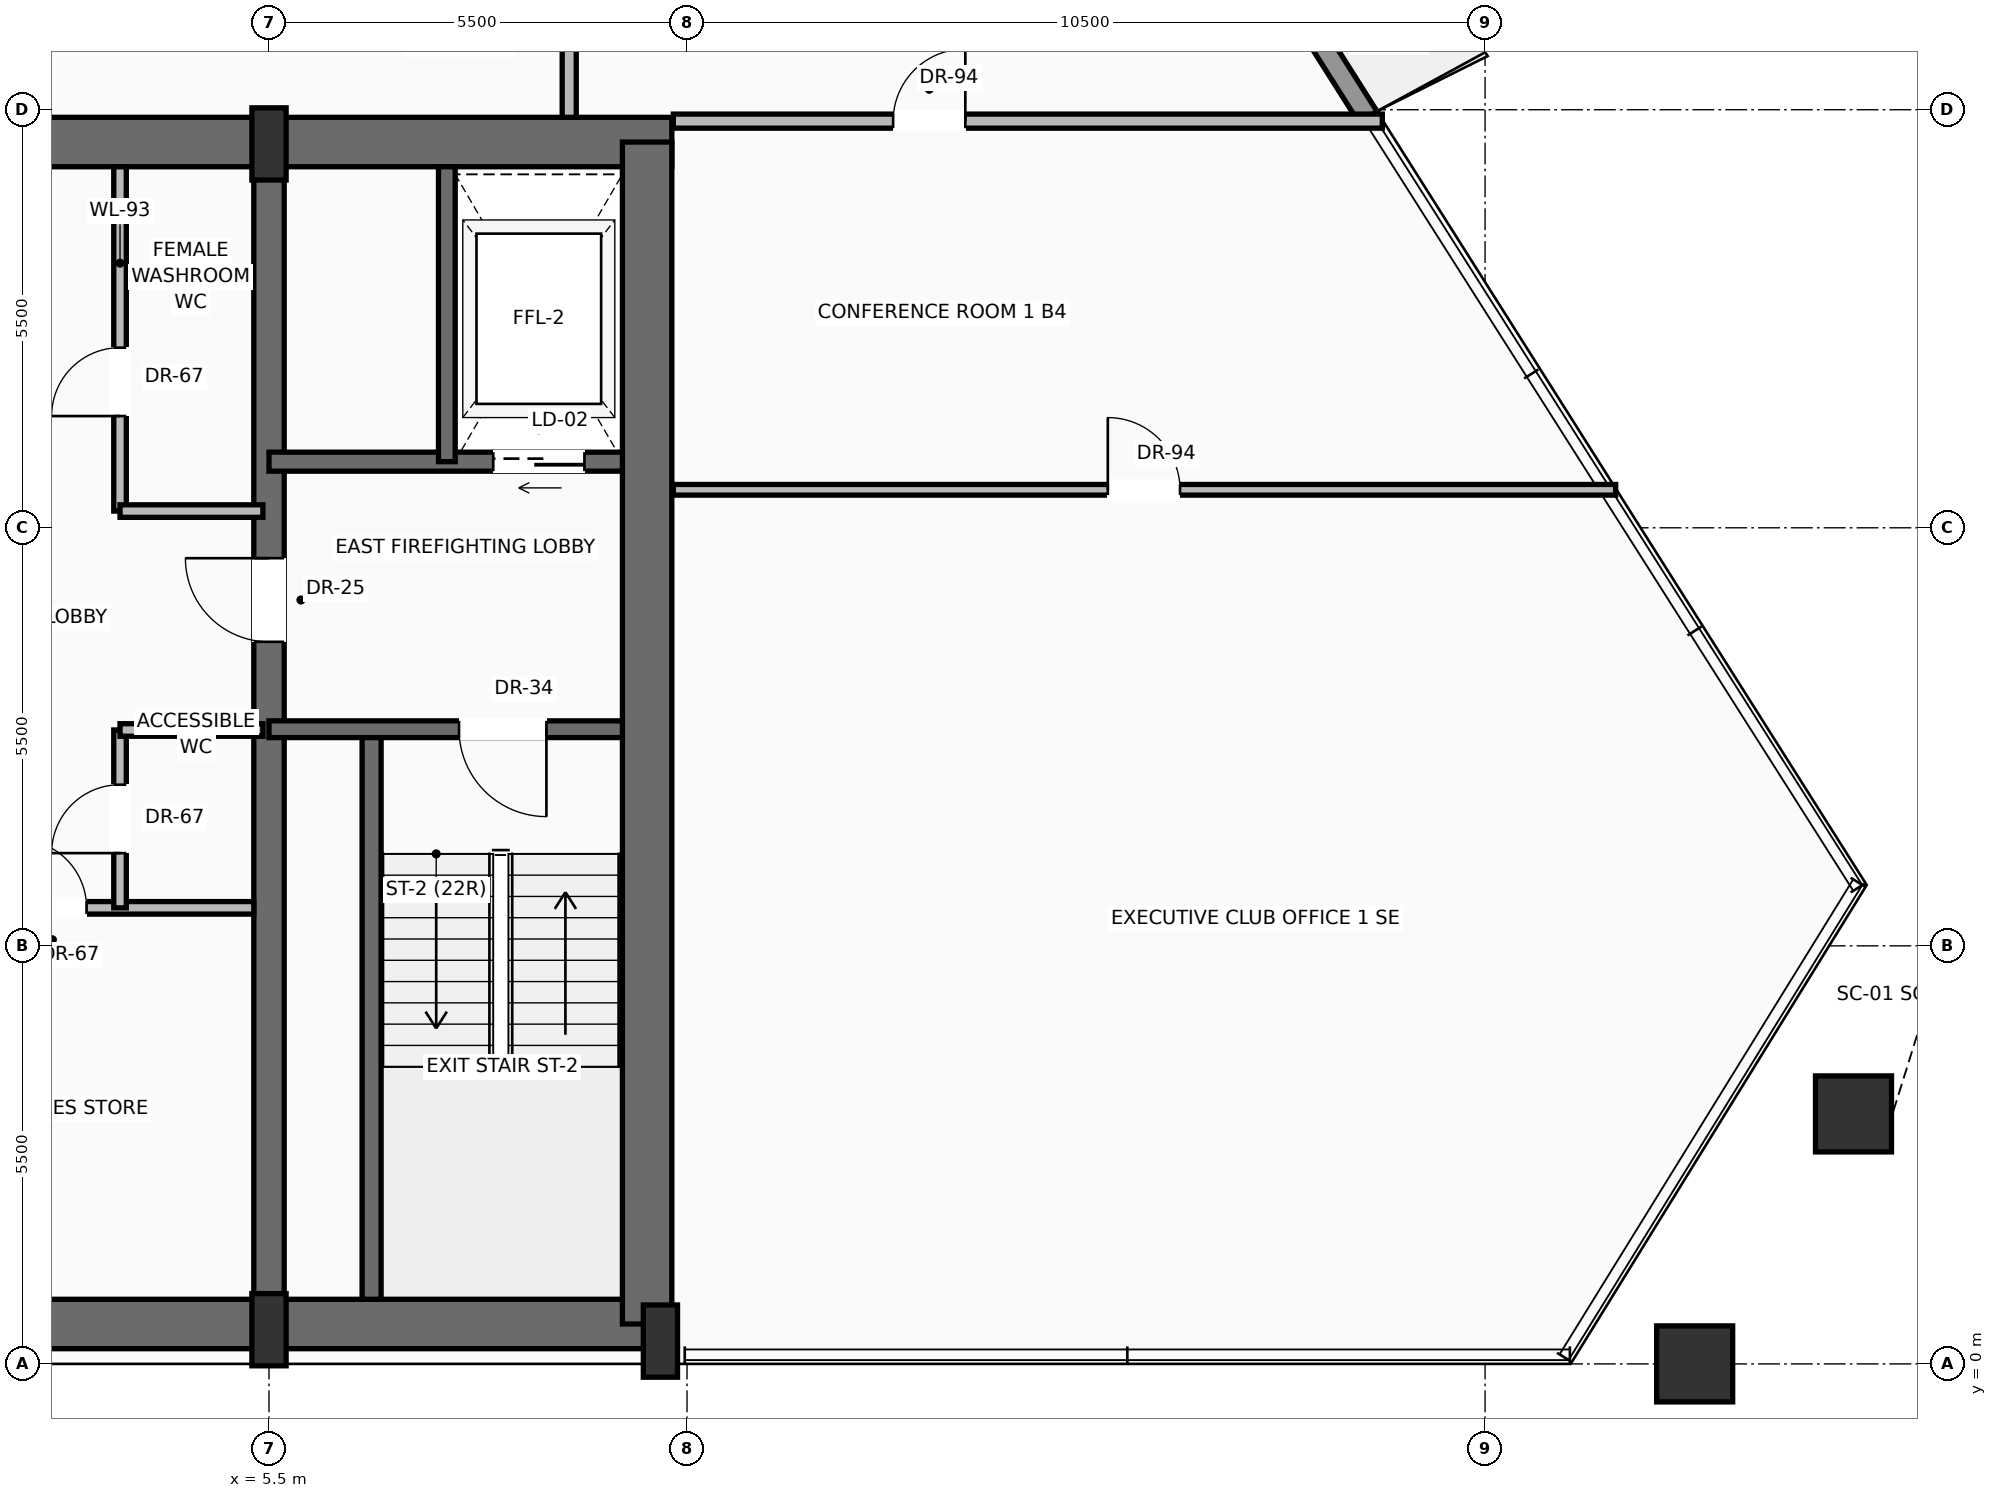
"""IFC4 building model, lengths in metres.
Left out: names, types, materials, properties, quantities, classifications, styles, units other than length and angle.
Written with IfcOpenShell. Run it as: python <this file> out.ifc"""

import sys

from ifc_helpers import new_model, si_unit, direction, frame, frame_2d, origin, origin_2d, place, context, subcontext, project, spatial, rectangle, hollow_rectangle, extrude, source, transform, mapped, element, fill, save


model = new_model("IFC4")
c1 = context("Model", 3, precision=1e-05, world=origin(), true_north=direction((0.0, 1.0)))
c2 = subcontext(c1, "Body", "Model", "MODEL_VIEW")
j1 = project(units=[si_unit("LENGTHUNIT", "METRE"), si_unit("PLANEANGLEUNIT", "RADIAN")], contexts=[c1])
p1 = place(None, origin())
s1 = spatial("IfcSite", under=j1, at=p1, CompositionType="ELEMENT")
p2 = place(p1, origin())
s2 = spatial("IfcBuilding", under=s1, at=p2, CompositionType="ELEMENT")
p3 = place(p2, frame((0.0, 0.0, 189.5)))
s3 = spatial("IfcBuildingStorey", under=s2, at=p3, CompositionType="ELEMENT", Elevation=189.5)
p4 = place(p3, frame((-10.65, 0.525, 0.0), z_axis=(0.0, 0.0, 1.0), x_axis=(1.0, 0.0, 0.0)))
e1 = element("IfcWall", 1, at=p4, inside=s3, PredefinedType="SHEAR", context=c2, shape_type="SweptSolid", body=[
    extrude(rectangle(XDim=21.3, YDim=0.65, at=frame_2d((10.65, 0.0))), origin(), (0.0, 0.0, 1.0), 3.47),
])
p5 = place(p3, frame((-10.8, 16.075, 0.0), z_axis=(0.0, 0.0, 1.0), x_axis=(1.0, 0.0, 0.0)))
e2 = element("IfcWall", 2, at=p5, inside=s3, PredefinedType="SHEAR", context=c2, shape_type="SweptSolid", body=[
    extrude(rectangle(XDim=21.6, YDim=0.65, at=frame_2d((10.8, 0.0))), origin(), (0.0, 0.0, 1.0), 3.47),
])
p6 = place(p5, frame((3.37, 0.0, 0.0)))
e3 = element("IfcOpeningElement", 3, at=p6, cuts=e2, PredefinedType="OPENING", context=c2, shape_type="SweptSolid", body=[
    extrude(rectangle(XDim=1.3, YDim=2.3, at=frame_2d((0.65, 1.15))), frame((0.0, 0.335, 0.0), z_axis=(0.0, -1.0, 0.0), x_axis=(1.0, 0.0, 0.0)), (0.0, 0.0, 1.0), 0.67),
])
p7 = place(p5, frame((9.8, 0.0, 0.0)))
e4 = element("IfcOpeningElement", 4, at=p7, cuts=e2, PredefinedType="OPENING", context=c2, shape_type="SweptSolid", body=[
    extrude(rectangle(XDim=2.0, YDim=2.4, at=frame_2d((1.0, 1.2))), frame((0.0, 0.335, 0.0), z_axis=(0.0, -1.0, 0.0), x_axis=(1.0, 0.0, 0.0)), (0.0, 0.0, 1.0), 0.67),
])
p8 = place(p3, frame((10.475, 0.525, 0.0), z_axis=(0.0, 0.0, 1.0), x_axis=(0.0, 1.0, 0.0)))
e5 = element("IfcWall", 5, at=p8, inside=s3, PredefinedType="SHEAR", context=c2, shape_type="SweptSolid", body=[
    extrude(rectangle(XDim=15.55, YDim=0.65, at=frame_2d((7.775, 0.0))), origin(), (0.0, 0.0, 1.0), 3.47),
])
p9 = place(p3, frame((5.5, 0.525, 0.0), z_axis=(0.0, 0.0, 1.0), x_axis=(0.0, 1.0, 0.0)))
e6 = element("IfcWall", 6, at=p9, inside=s3, PredefinedType="SHEAR", context=c2, shape_type="SweptSolid", body=[
    extrude(rectangle(XDim=15.55, YDim=0.4, at=frame_2d((7.775, 0.0))), origin(), (0.0, 0.0, 1.0), 3.47),
])
p10 = place(p9, frame((8.975, 0.0, 0.0)))
e7 = element("IfcOpeningElement", 7, at=p10, cuts=e6, PredefinedType="OPENING", context=c2, shape_type="SweptSolid", body=[
    extrude(rectangle(XDim=1.1, YDim=2.2, at=frame_2d((0.55, 1.1))), frame((0.0, 0.21, 0.0), z_axis=(0.0, -1.0, 0.0), x_axis=(1.0, 0.0, 0.0)), (0.0, 0.0, 1.0), 0.42),
])
m1 = source(origin(), c2, "Body", "SweptSolid", [
    extrude(rectangle(XDim=0.45, YDim=0.95, at=origin_2d()), origin(), (0.0, 0.0, 1.0), 3.7),
])
for number, where, z_axis, x_axis in (
    (8, (5.5, 0.45, 0.0), (0.0, 0.0, 1.0), (1.0, 0.0, 0.0)),
    (9, (10.65, 0.3, 0.0), (0.0, 0.0, 1.0), (1.0, 0.0, 0.0)),
    (10, (5.5, 16.05, 0.0), (0.0, 0.0, 1.0), (1.0, 0.0, 0.0)),
):
    element("IfcColumn", number, at=place(p3, frame(where, z_axis=z_axis, x_axis=x_axis)), inside=s3, PredefinedType="PILASTER", context=c2, shape_type="MappedRepresentation", body=[
        mapped(m1, transform((0.0, 0.0, 0.0), scale=1.0)),
    ])
m2 = source(origin(), c2, "Body", "SweptSolid", [
    extrude(hollow_rectangle(XDim=1.0, YDim=1.0, WallThickness=0.05, at=origin_2d()), origin(), (0.0, 0.0, 1.0), 3.691),
])
p11 = place(p3, frame((24.258, 0.0, 0.004), z_axis=(0.005026723977, 0.0, 0.999987365943), x_axis=(0.0, 1.0, 0.0)))
e11 = element("IfcColumn", 11, at=p11, inside=s3, PredefinedType="COLUMN", context=c2, shape_type="MappedRepresentation", body=[
    mapped(m2, transform((0.0, 0.0, 0.0), scale=1.0)),
])
m3 = source(origin(), c2, "Body", "SweptSolid", [
    extrude(hollow_rectangle(XDim=1.0, YDim=1.0, WallThickness=0.05, at=origin_2d()), origin(), (0.0, 0.0, 1.0), 3.692),
])
p12 = place(p3, frame((26.347, 3.289, 0.004), z_axis=(-0.006150427094, -0.014615531051, 0.999874271345), x_axis=(0.921713862649, -0.387870539486, 0.0)))
e12 = element("IfcColumn", 12, at=p12, inside=s3, PredefinedType="COLUMN", context=c2, shape_type="MappedRepresentation", body=[
    mapped(m3, transform((0.0, 0.0, 0.0), scale=1.0)),
])
p13 = place(p3, frame((9.833, 32.401, 0.0), z_axis=(0.0, 0.0, 1.0), x_axis=(0.534873816305, -0.844931950296, 0.0)))
e13 = element("IfcWall", 13, at=p13, inside=s3, PredefinedType="SOLIDWALL", context=c2, shape_type="SweptSolid", body=[
    extrude(rectangle(XDim=18.932, YDim=0.28, at=frame_2d((9.466, 0.0))), origin(), (0.0, 0.0, 1.0), 3.05),
])
p14 = place(p13, frame((4.544, 0.0, 0.0)))
e14 = element("IfcOpeningElement", 14, at=p14, cuts=e13, PredefinedType="OPENING", context=c2, shape_type="SweptSolid", body=[
    extrude(rectangle(XDim=1.6, YDim=2.35, at=frame_2d((0.8, 1.175))), frame((0.0, 0.15, 0.0), z_axis=(0.0, -1.0, 0.0), x_axis=(1.0, 0.0, 0.0)), (0.0, 0.0, 1.0), 0.3),
])
p15 = place(p13, frame((12.874, 0.0, 0.9)))
e15 = element("IfcOpeningElement", 15, at=p15, cuts=e13, PredefinedType="OPENING", context=c2, shape_type="SweptSolid", body=[
    extrude(rectangle(XDim=2.0, YDim=1.85, at=frame_2d((1.0, 0.925))), frame((0.0, 0.15, 0.0), z_axis=(0.0, -1.0, 0.0), x_axis=(1.0, 0.0, 0.0)), (0.0, 0.0, 1.0), 0.3),
])
p16 = place(p3, frame((6.85, 0.85, 0.0), z_axis=(0.0, 0.0, 1.0), x_axis=(0.0, 1.0, 0.0)))
e16 = element("IfcWall", 16, at=p16, inside=s3, PredefinedType="SOLIDWALL", context=c2, shape_type="SweptSolid", body=[
    extrude(rectangle(XDim=7.5, YDim=0.25, at=frame_2d((3.75, 0.0))), origin(), (0.0, 0.0, 1.0), 3.47),
])
p17 = place(p3, frame((10.15, 8.35, 0.0), z_axis=(0.0, 0.0, 1.0), x_axis=(-1.0, 0.0, 0.0)))
e17 = element("IfcWall", 17, at=p17, inside=s3, PredefinedType="SOLIDWALL", context=c2, shape_type="SweptSolid", body=[
    extrude(rectangle(XDim=4.65, YDim=0.22, at=frame_2d((2.325, 0.0))), origin(), (0.0, 0.0, 1.0), 3.47),
])
p18 = place(p17, frame((1.0, 0.0, 0.0)))
e18 = element("IfcOpeningElement", 18, at=p18, cuts=e17, PredefinedType="OPENING", context=c2, shape_type="SweptSolid", body=[
    extrude(rectangle(XDim=1.15, YDim=2.2, at=frame_2d((0.575, 1.1))), frame((0.0, 0.12, 0.0), z_axis=(0.0, -1.0, 0.0), x_axis=(1.0, 0.0, 0.0)), (0.0, 0.0, 1.0), 0.24),
])
p19 = place(p3, frame((10.15, 11.87, 0.0), z_axis=(0.0, 0.0, 1.0), x_axis=(-1.0, 0.0, 0.0)))
e19 = element("IfcWall", 19, at=p19, inside=s3, PredefinedType="SOLIDWALL", context=c2, shape_type="SweptSolid", body=[
    extrude(rectangle(XDim=4.65, YDim=0.25, at=frame_2d((2.325, 0.0))), origin(), (0.0, 0.0, 1.0), 3.47),
])
p20 = place(p19, frame((0.5, 0.0, 0.0)))
e20 = element("IfcOpeningElement", 20, at=p20, cuts=e19, PredefinedType="OPENING", context=c2, shape_type="SweptSolid", body=[
    extrude(rectangle(XDim=1.2, YDim=2.25, at=frame_2d((0.6, 1.125))), frame((0.0, 0.135, 0.0), z_axis=(0.0, -1.0, 0.0), x_axis=(1.0, 0.0, 0.0)), (0.0, 0.0, 1.0), 0.27),
])
p21 = place(p3, frame((7.84, 11.87, 0.0), z_axis=(0.0, 0.0, 1.0), x_axis=(0.0, 1.0, 0.0)))
e21 = element("IfcWall", 21, at=p21, inside=s3, PredefinedType="SOLIDWALL", context=c2, shape_type="SweptSolid", body=[
    extrude(rectangle(XDim=3.88, YDim=0.22, at=frame_2d((1.94, 0.0))), origin(), (0.0, 0.0, 1.0), 3.47),
])
p22 = place(p3, frame((1.82, 6.0, 0.0), z_axis=(0.0, 0.0, 1.0), x_axis=(1.0, 0.0, 0.0)))
e22 = element("IfcWall", 22, at=p22, inside=s3, PredefinedType="PARTITIONING", context=c2, shape_type="SweptSolid", body=[
    extrude(rectangle(XDim=3.48, YDim=0.165, at=frame_2d((1.74, 0.0))), origin(), (0.0, 0.0, 1.0), 3.462),
])
p23 = place(p22, frame((0.38, 0.0, 0.0)))
e23 = element("IfcOpeningElement", 23, at=p23, cuts=e22, PredefinedType="OPENING", context=c2, shape_type="SweptSolid", body=[
    extrude(rectangle(XDim=0.9, YDim=2.1, at=frame_2d((0.45, 1.05))), frame((0.0, 0.093, 0.0), z_axis=(0.0, -1.0, 0.0), x_axis=(1.0, 0.0, 0.0)), (0.0, 0.0, 1.0), 0.185),
])
p24 = place(p3, frame((3.54, 6.0, 0.0), z_axis=(0.0, 0.0, 1.0), x_axis=(0.0, 1.0, 0.0)))
e24 = element("IfcWall", 24, at=p24, inside=s3, PredefinedType="PARTITIONING", context=c2, shape_type="SweptSolid", body=[
    extrude(rectangle(XDim=2.34, YDim=0.165, at=frame_2d((1.17, 0.0))), origin(), (0.0, 0.0, 1.0), 3.462),
])
p25 = place(p24, frame((0.72, 0.0, 0.0)))
e25 = element("IfcOpeningElement", 25, at=p25, cuts=e24, PredefinedType="OPENING", context=c2, shape_type="SweptSolid", body=[
    extrude(rectangle(XDim=0.9, YDim=2.1, at=frame_2d((0.45, 1.05))), frame((0.0, 0.093, 0.0), z_axis=(0.0, -1.0, 0.0), x_axis=(1.0, 0.0, 0.0)), (0.0, 0.0, 1.0), 0.185),
])
p26 = place(p3, frame((3.54, 8.34, 0.0), z_axis=(0.0, 0.0, 1.0), x_axis=(1.0, 0.0, 0.0)))
e26 = element("IfcWall", 26, at=p26, inside=s3, PredefinedType="PARTITIONING", context=c2, shape_type="SweptSolid", body=[
    extrude(rectangle(XDim=1.88, YDim=0.165, at=frame_2d((0.94, 0.0))), origin(), (0.0, 0.0, 1.0), 3.462),
])
p27 = place(p3, frame((3.54, 11.22, 0.0), z_axis=(0.0, 0.0, 1.0), x_axis=(0.0, 1.0, 0.0)))
e27 = element("IfcWall", 27, at=p27, inside=s3, PredefinedType="PARTITIONING", context=c2, shape_type="SweptSolid", body=[
    extrude(rectangle(XDim=4.53, YDim=0.165, at=frame_2d((2.265, 0.0))), origin(), (0.0, 0.0, 1.0), 3.462),
])
p28 = place(p27, frame((1.25, 0.0, 0.0)))
e28 = element("IfcOpeningElement", 28, at=p28, cuts=e27, PredefinedType="OPENING", context=c2, shape_type="SweptSolid", body=[
    extrude(rectangle(XDim=0.9, YDim=2.1, at=frame_2d((0.45, 1.05))), frame((0.0, 0.093, 0.0), z_axis=(0.0, -1.0, 0.0), x_axis=(1.0, 0.0, 0.0)), (0.0, 0.0, 1.0), 0.185),
])
p29 = place(p3, frame((3.54, 11.22, 0.0), z_axis=(0.0, 0.0, 1.0), x_axis=(1.0, 0.0, 0.0)))
e29 = element("IfcWall", 29, at=p29, inside=s3, PredefinedType="PARTITIONING", context=c2, shape_type="SweptSolid", body=[
    extrude(rectangle(XDim=1.88, YDim=0.165, at=frame_2d((0.94, 0.0))), origin(), (0.0, 0.0, 1.0), 3.462),
])
p30 = place(p3, frame((9.45, 16.4, 0.0), z_axis=(0.0, 0.0, 1.0), x_axis=(0.0, 1.0, 0.0)))
e30 = element("IfcWall", 30, at=p30, inside=s3, PredefinedType="PARTITIONING", context=c2, shape_type="SweptSolid", body=[
    extrude(rectangle(XDim=7.0, YDim=0.185, at=frame_2d((3.5, 0.0))), origin(), (0.0, 0.0, 1.0), 3.462),
])
p31 = place(p30, frame((3.341, 0.0, 0.0)))
e31 = element("IfcOpeningElement", 31, at=p31, cuts=e30, PredefinedType="OPENING", context=c2, shape_type="SweptSolid", body=[
    extrude(rectangle(XDim=0.95, YDim=2.2, at=frame_2d((0.475, 1.1))), frame((0.0, 0.103, 0.0), z_axis=(0.0, -1.0, 0.0), x_axis=(1.0, 0.0, 0.0)), (0.0, 0.0, 1.0), 0.205),
])
p32 = place(p3, frame((10.82, 16.35, 0.0), z_axis=(0.0, 0.0, 1.0), x_axis=(1.0, 0.0, 0.0)))
e32 = element("IfcWall", 32, at=p32, inside=s3, PredefinedType="PARTITIONING", context=c2, shape_type="SweptSolid", body=[
    extrude(rectangle(XDim=9.328, YDim=0.185, at=frame_2d((4.664, 0.0))), origin(), (0.0, 0.0, 1.0), 3.462),
])
p33 = place(p32, frame((2.892, 0.0, 0.0)))
e33 = element("IfcOpeningElement", 33, at=p33, cuts=e32, PredefinedType="OPENING", context=c2, shape_type="SweptSolid", body=[
    extrude(rectangle(XDim=0.95, YDim=2.2, at=frame_2d((0.475, 1.1))), frame((0.0, 0.103, 0.0), z_axis=(0.0, -1.0, 0.0), x_axis=(1.0, 0.0, 0.0)), (0.0, 0.0, 1.0), 0.205),
])
p34 = place(p3, frame((10.82, 11.5, 0.0), z_axis=(0.0, 0.0, 1.0), x_axis=(1.0, 0.0, 0.0)))
e34 = element("IfcWall", 34, at=p34, inside=s3, PredefinedType="PARTITIONING", context=c2, shape_type="SweptSolid", body=[
    extrude(rectangle(XDim=12.398, YDim=0.14, at=frame_2d((6.199, 0.0))), origin(), (0.0, 0.0, 1.0), 3.462),
])
p35 = place(p34, frame((5.717, 0.0, 0.0)))
e35 = element("IfcOpeningElement", 35, at=p35, cuts=e34, PredefinedType="OPENING", context=c2, shape_type="SweptSolid", body=[
    extrude(rectangle(XDim=0.95, YDim=2.2, at=frame_2d((0.475, 1.1))), frame((0.0, 0.08, 0.0), z_axis=(0.0, -1.0, 0.0), x_axis=(1.0, 0.0, 0.0)), (0.0, 0.0, 1.0), 0.16),
])
m4 = source(origin(), c2, "Body", "SweptSolid", [
    extrude(rectangle(XDim=1.15, YDim=2.2, at=frame_2d((0.575, 1.1))), frame((0.0, 0.025, 0.0), z_axis=(0.0, -1.0, 0.0), x_axis=(1.0, 0.0, 0.0)), (0.0, 0.0, 1.0), 0.05),
])
p36 = place(p18, origin())
e36 = element("IfcDoor", 36, at=p36, inside=s3, OperationType="SINGLE_SWING_LEFT", PredefinedType="DOOR", context=c2, shape_type="MappedRepresentation", body=[
    mapped(m4, transform((0.0, 0.0, 0.0), scale=1.0)),
])
fill(e18, e36)
m5 = source(origin(), c2, "Body", "SweptSolid", [
    extrude(rectangle(XDim=1.1, YDim=2.2, at=frame_2d((0.55, 1.1))), frame((0.0, 0.025, 0.0), z_axis=(0.0, -1.0, 0.0), x_axis=(1.0, 0.0, 0.0)), (0.0, 0.0, 1.0), 0.05),
])
p37 = place(p10, origin())
e37 = element("IfcDoor", 37, at=p37, inside=s3, OperationType="SINGLE_SWING_RIGHT", PredefinedType="DOOR", context=c2, shape_type="MappedRepresentation", body=[
    mapped(m5, transform((0.0, 0.0, 0.0), scale=1.0)),
])
fill(e7, e37)
m6 = source(origin(), c2, "Body", "SweptSolid", [
    extrude(rectangle(XDim=1.2, YDim=2.25, at=frame_2d((0.6, 1.125))), frame((0.0, 0.025, 0.0), z_axis=(0.0, -1.0, 0.0), x_axis=(1.0, 0.0, 0.0)), (0.0, 0.0, 1.0), 0.05),
])
p38 = place(p20, origin())
e38 = element("IfcDoor", 38, at=p38, inside=s3, OperationType="SLIDING_TO_RIGHT", PredefinedType="DOOR", context=c2, shape_type="MappedRepresentation", body=[
    mapped(m6, transform((0.0, 0.0, 0.0), scale=1.0)),
])
fill(e20, e38)
m7 = source(origin(), c2, "Body", "SweptSolid", [
    extrude(rectangle(XDim=0.9, YDim=2.1, at=frame_2d((0.45, 1.05))), frame((0.0, 0.025, 0.0), z_axis=(0.0, -1.0, 0.0), x_axis=(1.0, 0.0, 0.0)), (0.0, 0.0, 1.0), 0.05),
])
p39 = place(p23, origin())
e39 = element("IfcDoor", 39, at=p39, inside=s3, OperationType="SINGLE_SWING_LEFT", PredefinedType="DOOR", context=c2, shape_type="MappedRepresentation", body=[
    mapped(m7, transform((0.0, 0.0, 0.0), scale=1.0)),
])
fill(e23, e39)
p40 = place(p25, origin())
e40 = element("IfcDoor", 40, at=p40, inside=s3, OperationType="SINGLE_SWING_LEFT", PredefinedType="DOOR", context=c2, shape_type="MappedRepresentation", body=[
    mapped(m7, transform((0.0, 0.0, 0.0), scale=1.0)),
])
fill(e25, e40)
p41 = place(p28, origin())
e41 = element("IfcDoor", 41, at=p41, inside=s3, OperationType="SINGLE_SWING_LEFT", PredefinedType="DOOR", context=c2, shape_type="MappedRepresentation", body=[
    mapped(m7, transform((0.0, 0.0, 0.0), scale=1.0)),
])
fill(e28, e41)
m8 = source(origin(), c2, "Body", "SweptSolid", [
    extrude(rectangle(XDim=0.95, YDim=2.2, at=frame_2d((0.475, 1.1))), frame((0.0, 0.025, 0.0), z_axis=(0.0, -1.0, 0.0), x_axis=(1.0, 0.0, 0.0)), (0.0, 0.0, 1.0), 0.05),
])
p42 = place(p33, origin())
e42 = element("IfcDoor", 42, at=p42, inside=s3, OperationType="SINGLE_SWING_RIGHT", PredefinedType="DOOR", context=c2, shape_type="MappedRepresentation", body=[
    mapped(m8, transform((0.0, 0.0, 0.0), scale=1.0)),
])
fill(e33, e42)
p43 = place(p35, origin())
e43 = element("IfcDoor", 43, at=p43, inside=s3, OperationType="SINGLE_SWING_LEFT", PredefinedType="DOOR", context=c2, shape_type="MappedRepresentation", body=[
    mapped(m8, transform((0.0, 0.0, 0.0), scale=1.0)),
])
fill(e35, e43)
save(model, sys.argv[1])
